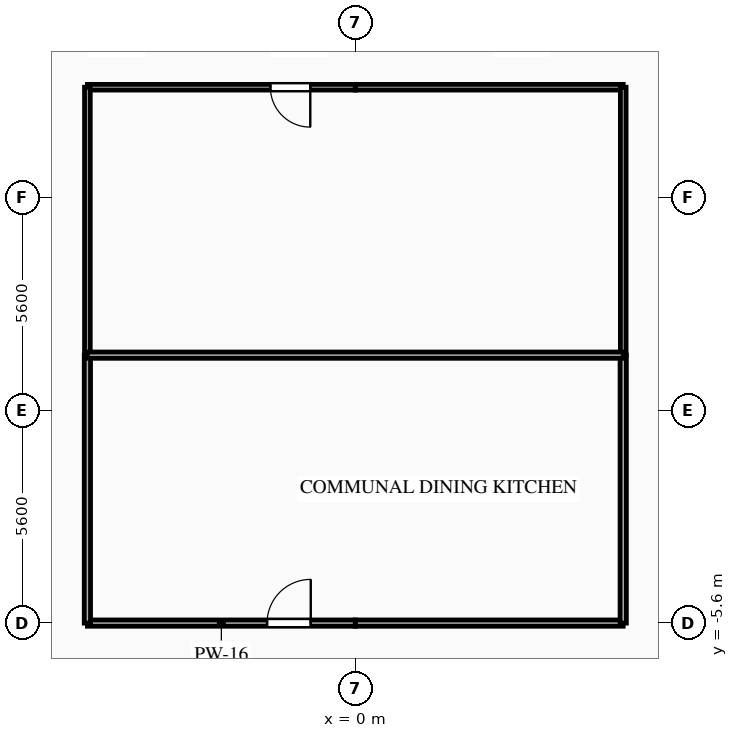
"""IFC4 building model, lengths in metres.
Left out: names, types, materials, properties, quantities, classifications, styles, units other than length and angle.
Written with IfcOpenShell. Run it as: python <this file> out.ifc"""

import sys

from ifc_helpers import new_model, si_unit, direction, frame, frame_2d, origin, place, context, subcontext, project, spatial, rectangle, extrude, element, fill, save


model = new_model("IFC4")
c1 = context("Model", 3, precision=1e-05, world=origin(), true_north=direction((0.0, 1.0)))
c2 = subcontext(c1, "Body", "Model", "MODEL_VIEW")
j1 = project(units=[si_unit("LENGTHUNIT", "METRE"), si_unit("PLANEANGLEUNIT", "RADIAN")], contexts=[c1])
p1 = place(None, origin())
s1 = spatial("IfcSite", under=j1, at=p1, CompositionType="ELEMENT")
p2 = place(p1, origin())
s2 = spatial("IfcBuilding", under=s1, at=p2, CompositionType="ELEMENT")
p3 = place(p2, frame((0.0, 0.0, 57.15)))
s3 = spatial("IfcBuildingStorey", under=s2, at=p3, CompositionType="ELEMENT", Elevation=57.15)
p4 = place(p3, frame((0.0, 8.5, 0.0), z_axis=(0.0, 0.0, 1.0), x_axis=(-1.0, 0.0, 0.0)))
e1 = element("IfcWall", 1, at=p4, inside=s3, PredefinedType="PARTITIONING", context=c2, shape_type="SweptSolid", body=[
    extrude(rectangle(XDim=7.05, YDim=0.15, at=frame_2d((3.525, 0.0))), origin(), (0.0, 0.0, 1.0), 3.035),
])
p5 = place(p4, frame((1.185, 0.0, 0.0)))
e2 = element("IfcOpeningElement", 2, at=p5, cuts=e1, PredefinedType="OPENING", context=c2, shape_type="SweptSolid", body=[
    extrude(rectangle(XDim=1.05, YDim=2.15, at=frame_2d((0.525, 1.075))), frame((0.0, 0.085, 0.0), z_axis=(0.0, -1.0, 0.0), x_axis=(1.0, 0.0, 0.0)), (0.0, 0.0, 1.0), 0.17),
])
p6 = place(p3, frame((7.05, 8.5, 0.0), z_axis=(0.0, 0.0, 1.0), x_axis=(-1.0, 0.0, 0.0)))
e3 = element("IfcWall", 3, at=p6, inside=s3, PredefinedType="PARTITIONING", context=c2, shape_type="SweptSolid", body=[
    extrude(rectangle(XDim=7.05, YDim=0.15, at=frame_2d((3.525, 0.0))), origin(), (0.0, 0.0, 1.0), 3.035),
])
p7 = place(p3, frame((-7.05, -5.6, 0.0), z_axis=(0.0, 0.0, 1.0), x_axis=(1.0, 0.0, 0.0)))
e4 = element("IfcWall", 4, at=p7, inside=s3, PredefinedType="PARTITIONING", context=c2, shape_type="SweptSolid", body=[
    extrude(rectangle(XDim=7.05, YDim=0.165, at=frame_2d((3.525, 0.0))), origin(), (0.0, 0.0, 1.0), 2.52),
])
p8 = place(p7, frame((4.728, 0.0, 0.0)))
e5 = element("IfcOpeningElement", 5, at=p8, cuts=e4, PredefinedType="OPENING", context=c2, shape_type="SweptSolid", body=[
    extrude(rectangle(XDim=1.15, YDim=2.15, at=frame_2d((0.575, 1.075))), frame((0.0, 0.093, 0.0), z_axis=(0.0, -1.0, 0.0), x_axis=(1.0, 0.0, 0.0)), (0.0, 0.0, 1.0), 0.185),
])
p9 = place(p3, frame((0.0, -5.6, 0.0), z_axis=(0.0, 0.0, 1.0), x_axis=(1.0, 0.0, 0.0)))
e6 = element("IfcWall", 6, at=p9, inside=s3, PredefinedType="PARTITIONING", context=c2, shape_type="SweptSolid", body=[
    extrude(rectangle(XDim=7.05, YDim=0.165, at=frame_2d((3.525, 0.0))), origin(), (0.0, 0.0, 1.0), 2.52),
])
p10 = place(p3, frame((-7.05, 1.45, 0.0), z_axis=(0.0, 0.0, 1.0), x_axis=(0.0, -1.0, 0.0)))
e7 = element("IfcWall", 7, at=p10, inside=s3, PredefinedType="PARTITIONING", context=c2, shape_type="SweptSolid", body=[
    extrude(rectangle(XDim=7.05, YDim=0.165, at=frame_2d((3.525, 0.0))), origin(), (0.0, 0.0, 1.0), 3.035),
])
p11 = place(p3, frame((-7.05, 8.5, 0.0), z_axis=(0.0, 0.0, 1.0), x_axis=(0.0, -1.0, 0.0)))
e8 = element("IfcWall", 8, at=p11, inside=s3, PredefinedType="PARTITIONING", context=c2, shape_type="SweptSolid", body=[
    extrude(rectangle(XDim=7.05, YDim=0.15, at=frame_2d((3.525, 0.0))), origin(), (0.0, 0.0, 1.0), 3.035),
])
p12 = place(p3, frame((7.05, -5.6, 0.0), z_axis=(0.0, 0.0, 1.0), x_axis=(0.0, 1.0, 0.0)))
e9 = element("IfcWall", 9, at=p12, inside=s3, PredefinedType="PARTITIONING", context=c2, shape_type="SweptSolid", body=[
    extrude(rectangle(XDim=7.05, YDim=0.165, at=frame_2d((3.525, 0.0))), origin(), (0.0, 0.0, 1.0), 3.035),
])
p13 = place(p3, frame((7.05, 1.45, 0.0), z_axis=(0.0, 0.0, 1.0), x_axis=(0.0, 1.0, 0.0)))
e10 = element("IfcWall", 10, at=p13, inside=s3, PredefinedType="PARTITIONING", context=c2, shape_type="SweptSolid", body=[
    extrude(rectangle(XDim=7.05, YDim=0.15, at=frame_2d((3.525, 0.0))), origin(), (0.0, 0.0, 1.0), 3.035),
])
p14 = place(p3, frame((-7.05, 1.45, 0.0), z_axis=(0.0, 0.0, 1.0), x_axis=(1.0, 0.0, 0.0)))
e11 = element("IfcWall", 11, at=p14, inside=s3, PredefinedType="PARTITIONING", context=c2, shape_type="SweptSolid", body=[
    extrude(rectangle(XDim=14.1, YDim=0.165, at=frame_2d((7.05, 0.0))), origin(), (0.0, 0.0, 1.0), 3.035),
])
p15 = place(p5, origin())
e12 = element("IfcDoor", 12, at=p15, inside=s3, OperationType="SINGLE_SWING_LEFT", PredefinedType="DOOR", context=c2, shape_type="SweptSolid", body=[
    extrude(rectangle(XDim=1.05, YDim=2.15, at=frame_2d((0.525, 1.075))), frame((0.0, 0.025, 0.0), z_axis=(0.0, -1.0, 0.0), x_axis=(1.0, 0.0, 0.0)), (0.0, 0.0, 1.0), 0.05),
])
fill(e2, e12)
p16 = place(p8, origin())
e13 = element("IfcDoor", 13, at=p16, inside=s3, OperationType="SINGLE_SWING_RIGHT", PredefinedType="DOOR", context=c2, shape_type="SweptSolid", body=[
    extrude(rectangle(XDim=1.15, YDim=2.15, at=frame_2d((0.575, 1.075))), frame((0.0, 0.025, 0.0), z_axis=(0.0, -1.0, 0.0), x_axis=(1.0, 0.0, 0.0)), (0.0, 0.0, 1.0), 0.05),
])
fill(e5, e13)
save(model, sys.argv[1])
